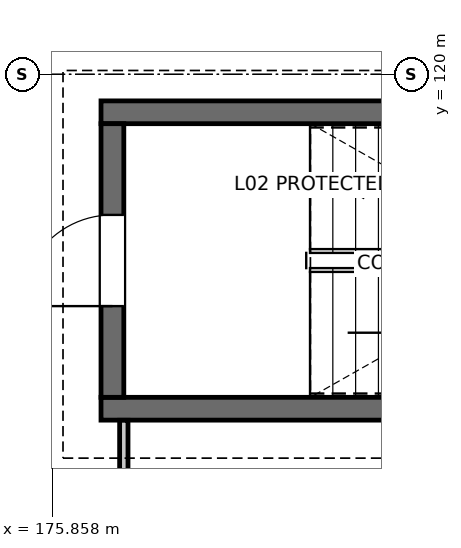
"""IFC4 building model, lengths in metres.
Left out: names, types, materials, properties, quantities, classifications, styles, units other than length and angle.
Written with IfcOpenShell. Run it as: python <this file> out.ifc"""

import sys

from ifc_helpers import new_model, si_unit, direction, frame, frame_2d, origin, place, context, subcontext, project, spatial, rectangle, extrude, element, fill, save


model = new_model("IFC4")
c1 = context("Model", 3, precision=1e-05, world=origin(), true_north=direction((0.0, 1.0)))
c2 = subcontext(c1, "Body", "Model", "MODEL_VIEW")
j1 = project(units=[si_unit("LENGTHUNIT", "METRE"), si_unit("PLANEANGLEUNIT", "RADIAN")], contexts=[c1])
p1 = place(None, origin())
s1 = spatial("IfcSite", under=j1, at=p1, CompositionType="ELEMENT")
p2 = place(p1, origin())
s2 = spatial("IfcBuilding", under=s1, at=p2, CompositionType="ELEMENT")
p3 = place(p2, frame((0.0, 0.0, 9.3)))
s3 = spatial("IfcBuildingStorey", under=s2, at=p3, CompositionType="ELEMENT", Elevation=9.3)
for number, where, z_axis, x_axis in (
    (1, (185.9, 115.6, 0.0), (0.0, 0.0, 1.0), (-1.0, 0.0, 0.0)),
    (2, (176.5, 119.5, 0.0), (0.0, 0.0, 1.0), (1.0, 0.0, 0.0)),
):
    element("IfcWall", number, at=place(p3, frame(where, z_axis=z_axis, x_axis=x_axis)), inside=s3, PredefinedType="SOLIDWALL", context=c2, shape_type="SweptSolid", body=[
        extrude(rectangle(XDim=9.4, YDim=0.3, at=frame_2d((4.7, 0.0))), origin(), (0.0, 0.0, 1.0), 3.6),
    ])
p4 = place(p3, frame((176.65, 115.75, 0.0), z_axis=(0.0, 0.0, 1.0), x_axis=(0.0, 1.0, 0.0)))
e3 = element("IfcWall", 3, at=p4, inside=s3, PredefinedType="SOLIDWALL", context=c2, shape_type="SweptSolid", body=[
    extrude(rectangle(XDim=3.6, YDim=0.3, at=frame_2d((1.8, 0.0))), origin(), (0.0, 0.0, 1.0), 3.6),
])
p5 = place(p4, frame((1.2, 0.0, 0.0)))
e4 = element("IfcOpeningElement", 4, at=p5, cuts=e3, PredefinedType="OPENING", context=c2, shape_type="SweptSolid", body=[
    extrude(rectangle(XDim=1.2, YDim=2.2, at=frame_2d((0.6, 1.1))), frame((0.0, 0.16, 0.0), z_axis=(0.0, -1.0, 0.0), x_axis=(1.0, 0.0, 0.0)), (0.0, 0.0, 1.0), 0.32),
])
p6 = place(p3, frame((176.8, 84.108, 0.0), z_axis=(0.0, 0.0, 1.0), x_axis=(0.0, 1.0, 0.0)))
e5 = element("IfcWall", 5, at=p6, inside=s3, PredefinedType="PARTITIONING", context=c2, shape_type="SweptSolid", body=[
    extrude(rectangle(XDim=31.34, YDim=0.11, at=frame_2d((15.67, 0.0))), origin(), (0.0, 0.0, 1.0), 2.823),
])
p7 = place(p6, frame((14.57, 0.0, 0.0)))
e6 = element("IfcOpeningElement", 6, at=p7, cuts=e5, PredefinedType="OPENING", context=c2, shape_type="SweptSolid", body=[
    extrude(rectangle(XDim=2.2, YDim=2.34, at=frame_2d((1.1, 1.17))), frame((0.0, 0.065, 0.0), z_axis=(0.0, -1.0, 0.0), x_axis=(1.0, 0.0, 0.0)), (0.0, 0.0, 1.0), 0.13),
])
p8 = place(p5, origin())
e7 = element("IfcDoor", 7, at=p8, inside=s3, OperationType="SINGLE_SWING_LEFT", PredefinedType="DOOR", context=c2, shape_type="SweptSolid", body=[
    extrude(rectangle(XDim=1.2, YDim=2.2, at=frame_2d((0.6, 1.1))), frame((0.0, 0.025, 0.0), z_axis=(0.0, -1.0, 0.0), x_axis=(1.0, 0.0, 0.0)), (0.0, 0.0, 1.0), 0.05),
])
fill(e4, e7)
save(model, sys.argv[1])
